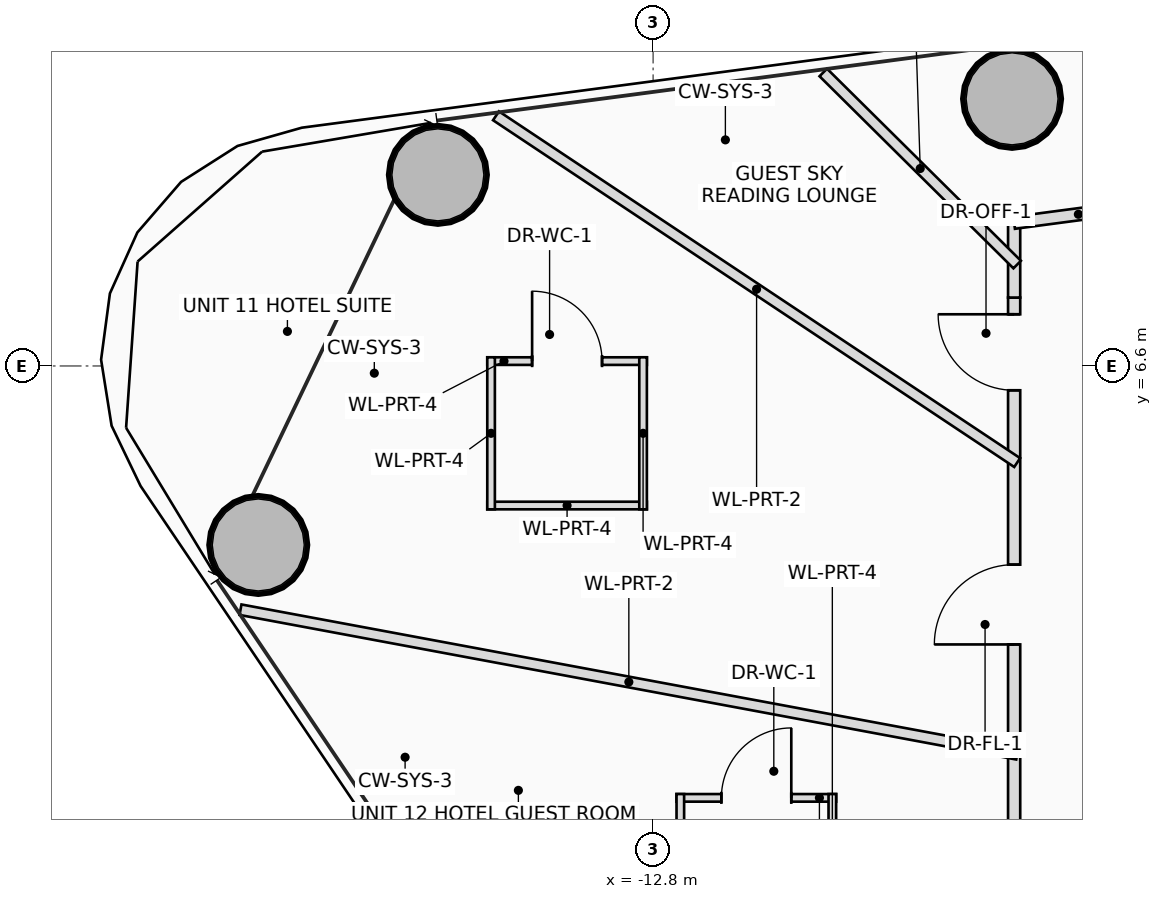
"""IFC4 building model, lengths in metres.
Left out: names, types, materials, properties, quantities, classifications, styles, units other than length and angle.
Written with IfcOpenShell. Run it as: python <this file> out.ifc"""

import sys

from ifc_helpers import new_model, si_unit, direction, frame, frame_2d, origin, origin_2d, place, context, subcontext, project, spatial, rectangle, hollow_circle, extrude, source, transform, mapped, element, fill, save


model = new_model("IFC4")
c1 = context("Model", 3, precision=1e-05, world=origin(), true_north=direction((0.0, 1.0)))
c2 = subcontext(c1, "Body", "Model", "MODEL_VIEW")
j1 = project(units=[si_unit("LENGTHUNIT", "METRE"), si_unit("PLANEANGLEUNIT", "RADIAN")], contexts=[c1])
p1 = place(None, origin())
s1 = spatial("IfcSite", under=j1, at=p1, CompositionType="ELEMENT")
p2 = place(p1, origin())
s2 = spatial("IfcBuilding", under=s1, at=p2, CompositionType="ELEMENT")
p3 = place(p2, frame((0.0, 0.0, 162.2)))
s3 = spatial("IfcBuildingStorey", under=s2, at=p3, CompositionType="ELEMENT", Elevation=162.2)
m1 = source(origin(), c2, "Body", "SweptSolid", [
    extrude(hollow_circle(Radius=0.65, WallThickness=0.045, at=origin_2d()), origin(), (0.0, 0.0, 1.0), 3.45),
])
for number, where, z_axis, x_axis in (
    (1, (-8.077, 10.114, 0.0), (0.0, 0.0, 1.0), (1.0, 0.0, 0.0)),
    (2, (-15.632, 9.114, 0.0), (0.0, 0.0, 1.0), (1.0, 0.0, 0.0)),
    (3, (-17.995, 4.245, 0.0), (0.0, 0.0, 1.0), (1.0, 0.0, 0.0)),
):
    element("IfcColumn", number, at=place(p3, frame(where, z_axis=z_axis, x_axis=x_axis)), inside=s3, PredefinedType="COLUMN", context=c2, shape_type="MappedRepresentation", body=[
        mapped(m1, transform((0.0, 0.0, 0.0), scale=1.0)),
    ])
p4 = place(p3, frame((-14.982, 6.664, 0.0), z_axis=(0.0, 0.0, 1.0), x_axis=(1.0, 0.0, 0.0)))
e4 = element("IfcWall", 4, at=p4, inside=s3, PredefinedType="PARTITIONING", context=c2, shape_type="SweptSolid", body=[
    extrude(rectangle(XDim=2.1, YDim=0.1, at=frame_2d((1.05, 0.0))), origin(), (0.0, 0.0, 1.0), 2.905),
])
p5 = place(p4, frame((0.59, 0.0, 0.0)))
e5 = element("IfcOpeningElement", 5, at=p5, cuts=e4, PredefinedType="OPENING", context=c2, shape_type="SweptSolid", body=[
    extrude(rectangle(XDim=0.92, YDim=2.1, at=frame_2d((0.46, 1.05))), frame((0.0, 0.06, 0.0), z_axis=(0.0, -1.0, 0.0), x_axis=(1.0, 0.0, 0.0)), (0.0, 0.0, 1.0), 0.12),
])
p6 = place(p3, frame((-12.882, 4.764, 0.0), z_axis=(0.0, 0.0, 1.0), x_axis=(-1.0, 0.0, 0.0)))
e6 = element("IfcWall", 6, at=p6, inside=s3, PredefinedType="PARTITIONING", context=c2, shape_type="SweptSolid", body=[
    extrude(rectangle(XDim=2.1, YDim=0.1, at=frame_2d((1.05, 0.0))), origin(), (0.0, 0.0, 1.0), 2.605),
])
p7 = place(p3, frame((-12.932, 6.714, 0.0), z_axis=(0.0, 0.0, 1.0), x_axis=(0.0, -1.0, 0.0)))
e7 = element("IfcWall", 7, at=p7, inside=s3, PredefinedType="PARTITIONING", context=c2, shape_type="SweptSolid", body=[
    extrude(rectangle(XDim=2.0, YDim=0.1, at=frame_2d((1.0, 0.0))), origin(), (0.0, 0.0, 1.0), 2.605),
])
p8 = place(p3, frame((-14.932, 4.714, 0.0), z_axis=(0.0, 0.0, 1.0), x_axis=(0.0, 1.0, 0.0)))
e8 = element("IfcWall", 8, at=p8, inside=s3, PredefinedType="PARTITIONING", context=c2, shape_type="SweptSolid", body=[
    extrude(rectangle(XDim=2.0, YDim=0.1, at=frame_2d((1.0, 0.0))), origin(), (0.0, 0.0, 1.0), 3.25),
])
p9 = place(p3, frame((-12.492, 0.918, 0.0), z_axis=(0.0, 0.0, 1.0), x_axis=(1.0, 0.0, 0.0)))
e9 = element("IfcWall", 9, at=p9, inside=s3, PredefinedType="PARTITIONING", context=c2, shape_type="SweptSolid", body=[
    extrude(rectangle(XDim=2.1, YDim=0.1, at=frame_2d((1.05, 0.0))), origin(), (0.0, 0.0, 1.0), 2.805),
])
p10 = place(p9, frame((0.59, 0.0, 0.0)))
e10 = element("IfcOpeningElement", 10, at=p10, cuts=e9, PredefinedType="OPENING", context=c2, shape_type="SweptSolid", body=[
    extrude(rectangle(XDim=0.92, YDim=2.1, at=frame_2d((0.46, 1.05))), frame((0.0, 0.06, 0.0), z_axis=(0.0, -1.0, 0.0), x_axis=(1.0, 0.0, 0.0)), (0.0, 0.0, 1.0), 0.12),
])
for number, where, z_axis, x_axis in (
    (11, (-10.442, 0.968, 0.0), (0.0, 0.0, 1.0), (0.0, -1.0, 0.0)),
    (12, (-12.442, -1.032, 0.0), (0.0, 0.0, 1.0), (0.0, 1.0, 0.0)),
):
    element("IfcWall", number, at=place(p3, frame(where, z_axis=z_axis, x_axis=x_axis)), inside=s3, PredefinedType="PARTITIONING", context=c2, shape_type="SweptSolid", body=[
        extrude(rectangle(XDim=2.0, YDim=0.1, at=frame_2d((1.0, 0.0))), origin(), (0.0, 0.0, 1.0), 3.25),
    ])
p11 = place(p3, frame((-8.05, -7.5, 0.0), z_axis=(0.0, 0.0, 1.0), x_axis=(0.0, 1.0, 0.0)))
e13 = element("IfcWall", 13, at=p11, inside=s3, PredefinedType="PARTITIONING", context=c2, shape_type="SweptSolid", body=[
    extrude(rectangle(XDim=15.0, YDim=0.16, at=frame_2d((7.5, 0.0))), origin(), (0.0, 0.0, 1.0), 2.605),
])
p12 = place(p11, frame((6.753, 0.0, 0.0)))
e14 = element("IfcOpeningElement", 14, at=p12, cuts=e13, PredefinedType="OPENING", context=c2, shape_type="SweptSolid", body=[
    extrude(rectangle(XDim=1.05, YDim=2.2, at=frame_2d((0.525, 1.1))), frame((0.0, 0.09, 0.0), z_axis=(0.0, -1.0, 0.0), x_axis=(1.0, 0.0, 0.0)), (0.0, 0.0, 1.0), 0.18),
])
p13 = place(p11, frame((10.436, 0.0, 0.0)))
e15 = element("IfcOpeningElement", 15, at=p13, cuts=e13, PredefinedType="OPENING", context=c2, shape_type="SweptSolid", body=[
    extrude(rectangle(XDim=1.05, YDim=2.2, at=frame_2d((0.525, 1.1))), frame((0.0, 0.09, 0.0), z_axis=(0.0, -1.0, 0.0), x_axis=(1.0, 0.0, 0.0)), (0.0, 0.0, 1.0), 0.18),
])
p14 = place(p11, frame((13.78, 0.0, 0.0)))
e16 = element("IfcOpeningElement", 16, at=p14, cuts=e13, PredefinedType="OPENING", context=c2, shape_type="SweptSolid", body=[
    extrude(rectangle(XDim=1.0, YDim=2.25, at=frame_2d((0.5, 1.125))), frame((0.0, 0.09, 0.0), z_axis=(0.0, -1.0, 0.0), x_axis=(1.0, 0.0, 0.0)), (0.0, 0.0, 1.0), 0.18),
])
p15 = place(p3, frame((-8.05, 7.5, 0.0), z_axis=(0.0, 0.0, 1.0), x_axis=(0.0, 1.0, 0.0)))
e17 = element("IfcWall", 17, at=p15, inside=s3, PredefinedType="PARTITIONING", context=c2, shape_type="SweptSolid", body=[
    extrude(rectangle(XDim=0.984, YDim=0.16, at=frame_2d((0.492, 0.0))), origin(), (0.0, 0.0, 1.0), 2.805),
])
p16 = place(p3, frame((-8.05, 8.484, 0.0), z_axis=(0.0, 0.0, 1.0), x_axis=(0.991338869543, 0.131328769629, 0.0)))
e18 = element("IfcWall", 18, at=p16, inside=s3, PredefinedType="PARTITIONING", context=c2, shape_type="SweptSolid", body=[
    extrude(rectangle(XDim=1.705, YDim=0.16, at=frame_2d((0.852, 0.0))), origin(), (0.0, 0.0, 1.0), 2.605),
])
p17 = place(p3, frame((-8.01, 7.934, 0.0), z_axis=(0.0, 0.0, 1.0), x_axis=(-0.710464129117, 0.703733416315, 0.0)))
e19 = element("IfcWall", 19, at=p17, inside=s3, PredefinedType="PARTITIONING", context=c2, shape_type="SweptSolid", body=[
    extrude(rectangle(XDim=3.591, YDim=0.14, at=frame_2d((1.795, 0.0))), origin(), (0.0, 0.0, 1.0), 2.765),
])
p18 = place(p3, frame((-8.01, 5.329, 0.0), z_axis=(0.0, 0.0, 1.0), x_axis=(-0.832565256492, 0.553926975044, 0.0)))
e20 = element("IfcWall", 20, at=p18, inside=s3, PredefinedType="PARTITIONING", context=c2, shape_type="SweptSolid", body=[
    extrude(rectangle(XDim=8.236, YDim=0.14, at=frame_2d((4.118, 0.0))), origin(), (0.0, 0.0, 1.0), 2.605),
])
p19 = place(p3, frame((-8.01, 1.491, 0.0), z_axis=(0.0, 0.0, 1.0), x_axis=(-0.983113838534, 0.182995028575, 0.0)))
e21 = element("IfcWall", 21, at=p19, inside=s3, PredefinedType="PARTITIONING", context=c2, shape_type="SweptSolid", body=[
    extrude(rectangle(XDim=10.394, YDim=0.14, at=frame_2d((5.197, 0.0))), origin(), (0.0, 0.0, 1.0), 2.765),
])
p20 = place(p5, origin())
e22 = element("IfcDoor", 22, at=p20, inside=s3, OperationType="SINGLE_SWING_LEFT", PredefinedType="DOOR", context=c2, shape_type="SweptSolid", body=[
    extrude(rectangle(XDim=0.92, YDim=2.1, at=frame_2d((0.46, 1.05))), frame((0.0, 0.025, 0.0), z_axis=(0.0, -1.0, 0.0), x_axis=(1.0, 0.0, 0.0)), (0.0, 0.0, 1.0), 0.05),
])
fill(e5, e22)
p21 = place(p10, origin())
e23 = element("IfcDoor", 23, at=p21, inside=s3, OperationType="SINGLE_SWING_RIGHT", PredefinedType="DOOR", context=c2, shape_type="SweptSolid", body=[
    extrude(rectangle(XDim=0.92, YDim=2.1, at=frame_2d((0.46, 1.05))), frame((0.0, 0.025, 0.0), z_axis=(0.0, -1.0, 0.0), x_axis=(1.0, 0.0, 0.0)), (0.0, 0.0, 1.0), 0.05),
])
fill(e10, e23)
p22 = place(p13, origin())
e24 = element("IfcDoor", 24, at=p22, inside=s3, OperationType="SINGLE_SWING_LEFT", PredefinedType="DOOR", context=c2, shape_type="SweptSolid", body=[
    extrude(rectangle(XDim=1.05, YDim=2.2, at=frame_2d((0.525, 1.1))), frame((0.0, 0.025, 0.0), z_axis=(0.0, -1.0, 0.0), x_axis=(1.0, 0.0, 0.0)), (0.0, 0.0, 1.0), 0.05),
])
fill(e15, e24)
p23 = place(p14, origin())
e25 = element("IfcDoor", 25, at=p23, inside=s3, OperationType="SINGLE_SWING_RIGHT", PredefinedType="DOOR", context=c2, shape_type="SweptSolid", body=[
    extrude(rectangle(XDim=1.0, YDim=2.25, at=frame_2d((0.5, 1.125))), frame((0.0, 0.025, 0.0), z_axis=(0.0, -1.0, 0.0), x_axis=(1.0, 0.0, 0.0)), (0.0, 0.0, 1.0), 0.05),
])
fill(e16, e25)
save(model, sys.argv[1])
